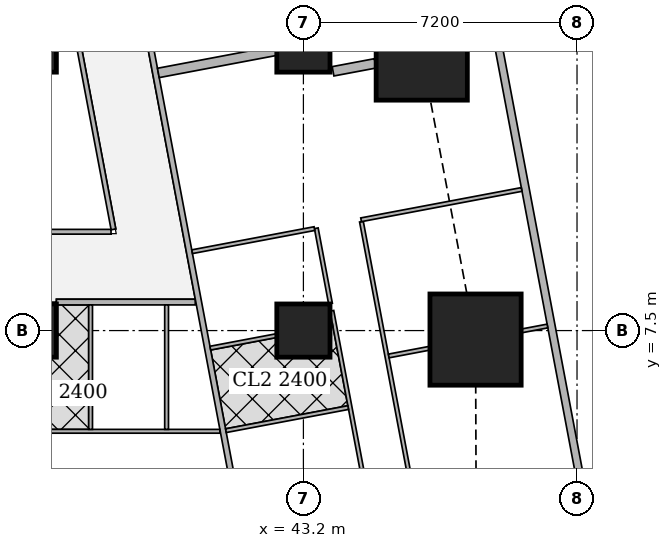
"""IFC4 building model, lengths in metres.
Left out: names, types, materials, properties, quantities, classifications, styles, units other than length and angle.
Written with IfcOpenShell. Run it as: python <this file> out.ifc"""

import sys

from ifc_helpers import new_model, si_unit, direction, frame, frame_2d, origin, origin_2d, place, context, subcontext, project, spatial, rectangle, extrude, element, fill, save


model = new_model("IFC4")
c1 = context("Model", 3, precision=1e-05, world=origin(), true_north=direction((0.0, 1.0)))
c2 = subcontext(c1, "Body", "Model", "MODEL_VIEW")
j1 = project(units=[si_unit("LENGTHUNIT", "METRE"), si_unit("PLANEANGLEUNIT", "RADIAN")], contexts=[c1])
p1 = place(None, origin())
s1 = spatial("IfcSite", under=j1, at=p1, CompositionType="ELEMENT")
p2 = place(p1, origin())
s2 = spatial("IfcBuilding", under=s1, at=p2, CompositionType="ELEMENT")
p3 = place(p2, frame((0.0, 0.0, 193.7)))
s3 = spatial("IfcBuildingStorey", under=s2, at=p3, CompositionType="ELEMENT", Elevation=193.7)
for number, where, z_axis, x_axis in (
    (1, (36.0, 7.5, 0.0), (0.0, 0.0, 1.0), (1.0, 0.0, 0.0)),
    (2, (43.2, 7.5, 0.0), (0.0, 0.0, 1.0), (1.0, 0.0, 0.0)),
):
    element("IfcColumn", number, at=place(p3, frame(where, z_axis=z_axis, x_axis=x_axis)), inside=s3, PredefinedType="COLUMN", context=c2, shape_type="SweptSolid", body=[
        extrude(rectangle(XDim=1.4, YDim=1.4, at=origin_2d()), origin(), (0.0, 0.0, 1.0), 3.75),
    ])
p4 = place(p3, frame((47.73, 7.263, 0.0), z_axis=(0.0, 0.0, 1.0), x_axis=(1.0, 0.0, 0.0)))
e3 = element("IfcColumn", 3, at=p4, inside=s3, PredefinedType="COLUMN", context=c2, shape_type="SweptSolid", body=[
    extrude(rectangle(XDim=2.4, YDim=2.4, at=origin_2d()), origin(), (0.0, 0.0, 1.0), 3.75),
])
for number, where, z_axis, x_axis in (
    (4, (36.0, 15.0, 0.0), (0.0, 0.0, 1.0), (1.0, 0.0, 0.0)),
    (5, (43.2, 15.0, 0.0), (0.0, 0.0, 1.0), (1.0, 0.0, 0.0)),
):
    element("IfcColumn", number, at=place(p3, frame(where, z_axis=z_axis, x_axis=x_axis)), inside=s3, PredefinedType="COLUMN", context=c2, shape_type="SweptSolid", body=[
        extrude(rectangle(XDim=1.4, YDim=1.4, at=origin_2d()), origin(), (0.0, 0.0, 1.0), 3.75),
    ])
p5 = place(p3, frame((46.314, 14.763, 0.0), z_axis=(0.0, 0.0, 1.0), x_axis=(1.0, 0.0, 0.0)))
e6 = element("IfcColumn", 6, at=p5, inside=s3, PredefinedType="COLUMN", context=c2, shape_type="SweptSolid", body=[
    extrude(rectangle(XDim=2.4, YDim=2.4, at=origin_2d()), origin(), (0.0, 0.0, 1.0), 3.75),
])
p6 = place(p3, frame((50.653, 2.703, 0.0), z_axis=(0.0, 0.0, 1.0), x_axis=(-0.185612026696, 0.982623109613, 0.0)))
e7 = element("IfcWall", 7, at=p6, inside=s3, PredefinedType="SOLIDWALL", context=c2, shape_type="SweptSolid", body=[
    extrude(rectangle(XDim=41.393, YDim=0.2, at=frame_2d((20.697, 0.0))), origin(), (0.0, 0.0, 1.0), 3.5),
])
p7 = place(p6, frame((1.633, 0.0, 0.9)))
e8 = element("IfcOpeningElement", 8, at=p7, cuts=e7, PredefinedType="OPENING", context=c2, shape_type="SweptSolid", body=[
    extrude(rectangle(XDim=1.8, YDim=1.5, at=frame_2d((0.9, 0.75))), frame((0.0, 0.11, 0.0), z_axis=(0.0, -1.0, 0.0), x_axis=(1.0, 0.0, 0.0)), (0.0, 0.0, 1.0), 0.22),
])
p8 = place(p6, frame((6.032, 0.0, 0.9)))
e9 = element("IfcOpeningElement", 9, at=p8, cuts=e7, PredefinedType="OPENING", context=c2, shape_type="SweptSolid", body=[
    extrude(rectangle(XDim=1.8, YDim=1.5, at=frame_2d((0.9, 0.75))), frame((0.0, 0.11, 0.0), z_axis=(0.0, -1.0, 0.0), x_axis=(1.0, 0.0, 0.0)), (0.0, 0.0, 1.0), 0.22),
])
p9 = place(p6, frame((9.848, 0.0, 0.9)))
e10 = element("IfcOpeningElement", 10, at=p9, cuts=e7, PredefinedType="OPENING", context=c2, shape_type="SweptSolid", body=[
    extrude(rectangle(XDim=1.8, YDim=1.5, at=frame_2d((0.9, 0.75))), frame((0.0, 0.11, 0.0), z_axis=(0.0, -1.0, 0.0), x_axis=(1.0, 0.0, 0.0)), (0.0, 0.0, 1.0), 0.22),
])
p10 = place(p6, frame((13.664, 0.0, 0.9)))
e11 = element("IfcOpeningElement", 11, at=p10, cuts=e7, PredefinedType="OPENING", context=c2, shape_type="SweptSolid", body=[
    extrude(rectangle(XDim=1.8, YDim=1.5, at=frame_2d((0.9, 0.75))), frame((0.0, 0.11, 0.0), z_axis=(0.0, -1.0, 0.0), x_axis=(1.0, 0.0, 0.0)), (0.0, 0.0, 1.0), 0.22),
])
p11 = place(p6, frame((17.481, 0.0, 0.9)))
e12 = element("IfcOpeningElement", 12, at=p11, cuts=e7, PredefinedType="OPENING", context=c2, shape_type="SweptSolid", body=[
    extrude(rectangle(XDim=1.8, YDim=1.5, at=frame_2d((0.9, 0.75))), frame((0.0, 0.11, 0.0), z_axis=(0.0, -1.0, 0.0), x_axis=(1.0, 0.0, 0.0)), (0.0, 0.0, 1.0), 0.22),
])
p12 = place(p6, frame((21.297, 0.0, 0.9)))
e13 = element("IfcOpeningElement", 13, at=p12, cuts=e7, PredefinedType="OPENING", context=c2, shape_type="SweptSolid", body=[
    extrude(rectangle(XDim=1.8, YDim=1.5, at=frame_2d((0.9, 0.75))), frame((0.0, 0.11, 0.0), z_axis=(0.0, -1.0, 0.0), x_axis=(1.0, 0.0, 0.0)), (0.0, 0.0, 1.0), 0.22),
])
p13 = place(p6, frame((25.113, 0.0, 0.9)))
e14 = element("IfcOpeningElement", 14, at=p13, cuts=e7, PredefinedType="OPENING", context=c2, shape_type="SweptSolid", body=[
    extrude(rectangle(XDim=1.8, YDim=1.5, at=frame_2d((0.9, 0.75))), frame((0.0, 0.11, 0.0), z_axis=(0.0, -1.0, 0.0), x_axis=(1.0, 0.0, 0.0)), (0.0, 0.0, 1.0), 0.22),
])
p14 = place(p6, frame((28.93, 0.0, 0.9)))
e15 = element("IfcOpeningElement", 15, at=p14, cuts=e7, PredefinedType="OPENING", context=c2, shape_type="SweptSolid", body=[
    extrude(rectangle(XDim=1.8, YDim=1.5, at=frame_2d((0.9, 0.75))), frame((0.0, 0.11, 0.0), z_axis=(0.0, -1.0, 0.0), x_axis=(1.0, 0.0, 0.0)), (0.0, 0.0, 1.0), 0.22),
])
p15 = place(p6, frame((32.746, 0.0, 0.9)))
e16 = element("IfcOpeningElement", 16, at=p15, cuts=e7, PredefinedType="OPENING", context=c2, shape_type="SweptSolid", body=[
    extrude(rectangle(XDim=1.8, YDim=1.5, at=frame_2d((0.9, 0.75))), frame((0.0, 0.11, 0.0), z_axis=(0.0, -1.0, 0.0), x_axis=(1.0, 0.0, 0.0)), (0.0, 0.0, 1.0), 0.22),
])
p16 = place(p6, frame((36.481, 0.0, 0.9)))
e17 = element("IfcOpeningElement", 17, at=p16, cuts=e7, PredefinedType="OPENING", context=c2, shape_type="SweptSolid", body=[
    extrude(rectangle(XDim=1.8, YDim=1.5, at=frame_2d((0.9, 0.75))), frame((0.0, 0.11, 0.0), z_axis=(0.0, -1.0, 0.0), x_axis=(1.0, 0.0, 0.0)), (0.0, 0.0, 1.0), 0.22),
])
p17 = place(p3, frame((40.355, 8.25, 0.0), z_axis=(0.0, 0.0, 1.0), x_axis=(-1.0, 0.0, 0.0)))
e18 = element("IfcWall", 18, at=p17, inside=s3, PredefinedType="SOLIDWALL", context=c2, shape_type="SweptSolid", body=[
    extrude(rectangle(XDim=3.654, YDim=0.15, at=frame_2d((1.827, 0.0))), origin(), (0.0, 0.0, 1.0), 3.5),
])
p18 = place(p3, frame((33.933, 42.73, 0.0), z_axis=(0.0, 0.0, 1.0), x_axis=(0.185595417643, -0.982626246825, 0.0)))
e19 = element("IfcWall", 19, at=p18, inside=s3, PredefinedType="SOLIDWALL", context=c2, shape_type="SweptSolid", body=[
    extrude(rectangle(XDim=41.051, YDim=0.15, at=frame_2d((20.525, 0.0))), origin(), (0.0, 0.0, 1.0), 2.5),
])
p19 = place(p18, frame((16.082, 0.0, 0.0)))
e20 = element("IfcOpeningElement", 20, at=p19, cuts=e19, PredefinedType="OPENING", context=c2, shape_type="SweptSolid", body=[
    extrude(rectangle(XDim=1.0, YDim=2.1, at=frame_2d((0.5, 1.05))), frame((0.0, 0.085, 0.0), z_axis=(0.0, -1.0, 0.0), x_axis=(1.0, 0.0, 0.0)), (0.0, 0.0, 1.0), 0.17),
])
p20 = place(p18, frame((19.898, 0.0, 0.0)))
e21 = element("IfcOpeningElement", 21, at=p20, cuts=e19, PredefinedType="OPENING", context=c2, shape_type="SweptSolid", body=[
    extrude(rectangle(XDim=1.0, YDim=2.1, at=frame_2d((0.5, 1.05))), frame((0.0, 0.085, 0.0), z_axis=(0.0, -1.0, 0.0), x_axis=(1.0, 0.0, 0.0)), (0.0, 0.0, 1.0), 0.17),
])
p21 = place(p18, frame((30.862, 0.0, 0.0)))
e22 = element("IfcOpeningElement", 22, at=p21, cuts=e19, PredefinedType="OPENING", context=c2, shape_type="SweptSolid", body=[
    extrude(rectangle(XDim=1.0, YDim=2.1, at=frame_2d((0.5, 1.05))), frame((0.0, 0.085, 0.0), z_axis=(0.0, -1.0, 0.0), x_axis=(1.0, 0.0, 0.0)), (0.0, 0.0, 1.0), 0.17),
])
p22 = place(p3, frame((41.002, 4.85, 0.0), z_axis=(0.0, 0.0, 1.0), x_axis=(-1.0, 0.0, 0.0)))
e23 = element("IfcWall", 23, at=p22, inside=s3, PredefinedType="PARTITIONING", context=c2, shape_type="SweptSolid", body=[
    extrude(rectangle(XDim=8.602, YDim=0.1, at=frame_2d((4.301, 0.0))), origin(), (0.0, 0.0, 1.0), 3.5),
])
p23 = place(p22, frame((7.047, 0.0, 0.0)))
e24 = element("IfcOpeningElement", 24, at=p23, cuts=e23, PredefinedType="OPENING", context=c2, shape_type="SweptSolid", body=[
    extrude(rectangle(XDim=0.9, YDim=2.1, at=frame_2d((0.45, 1.05))), frame((0.0, 0.06, 0.0), z_axis=(0.0, -1.0, 0.0), x_axis=(1.0, 0.0, 0.0)), (0.0, 0.0, 1.0), 0.12),
])
p24 = place(p22, frame((3.752, 0.0, 0.0)))
e25 = element("IfcOpeningElement", 25, at=p24, cuts=e23, PredefinedType="OPENING", context=c2, shape_type="SweptSolid", body=[
    extrude(rectangle(XDim=0.9, YDim=2.1, at=frame_2d((0.45, 1.05))), frame((0.0, 0.06, 0.0), z_axis=(0.0, -1.0, 0.0), x_axis=(1.0, 0.0, 0.0)), (0.0, 0.0, 1.0), 0.12),
])
p25 = place(p22, frame((0.15, 0.0, 0.0)))
e26 = element("IfcOpeningElement", 26, at=p25, cuts=e23, PredefinedType="OPENING", context=c2, shape_type="SweptSolid", body=[
    extrude(rectangle(XDim=0.9, YDim=2.1, at=frame_2d((0.45, 1.05))), frame((0.0, 0.06, 0.0), z_axis=(0.0, -1.0, 0.0), x_axis=(1.0, 0.0, 0.0)), (0.0, 0.0, 1.0), 0.12),
])
p26 = place(p22, frame((5.247, 0.0, 0.0)))
e27 = element("IfcOpeningElement", 27, at=p26, cuts=e23, PredefinedType="OPENING", context=c2, shape_type="SweptSolid", body=[
    extrude(rectangle(XDim=0.9, YDim=2.1, at=frame_2d((0.45, 1.05))), frame((0.0, 0.06, 0.0), z_axis=(0.0, -1.0, 0.0), x_axis=(1.0, 0.0, 0.0)), (0.0, 0.0, 1.0), 0.12),
])
p27 = place(p22, frame((1.952, 0.0, 0.0)))
e28 = element("IfcOpeningElement", 28, at=p27, cuts=e23, PredefinedType="OPENING", context=c2, shape_type="SweptSolid", body=[
    extrude(rectangle(XDim=0.9, YDim=2.1, at=frame_2d((0.45, 1.05))), frame((0.0, 0.06, 0.0), z_axis=(0.0, -1.0, 0.0), x_axis=(1.0, 0.0, 0.0)), (0.0, 0.0, 1.0), 0.12),
])
for number, where, z_axis, x_axis in (
    (29, (39.6, 4.9, 0.0), (0.0, 0.0, 1.0), (0.0, 1.0, 0.0)),
    (30, (37.6, 4.9, 0.0), (0.0, 0.0, 1.0), (0.0, 1.0, 0.0)),
):
    element("IfcWall", number, at=place(p3, frame(where, z_axis=z_axis, x_axis=x_axis)), inside=s3, PredefinedType="PARTITIONING", context=c2, shape_type="SweptSolid", body=[
        extrude(rectangle(XDim=3.275, YDim=0.1, at=frame_2d((1.638, 0.0))), origin(), (0.0, 0.0, 1.0), 3.5),
    ])
p28 = place(p3, frame((44.727, 10.366, 0.0), z_axis=(0.0, 0.0, 1.0), x_axis=(0.185678775129, -0.982610498858, 0.0)))
e31 = element("IfcWall", 31, at=p28, inside=s3, PredefinedType="PARTITIONING", context=c2, shape_type="SweptSolid", body=[
    extrude(rectangle(XDim=7.421, YDim=0.1, at=frame_2d((3.71, 0.0))), origin(), (0.0, 0.0, 1.0), 3.5),
])
p29 = place(p28, frame((0.151, 0.0, 0.0)))
e32 = element("IfcOpeningElement", 32, at=p29, cuts=e31, PredefinedType="OPENING", context=c2, shape_type="SweptSolid", body=[
    extrude(rectangle(XDim=0.9, YDim=2.1, at=frame_2d((0.45, 1.05))), frame((0.0, 0.06, 0.0), z_axis=(0.0, -1.0, 0.0), x_axis=(1.0, 0.0, 0.0)), (0.0, 0.0, 1.0), 0.12),
])
p30 = place(p28, frame((4.65, 0.0, 0.0)))
e33 = element("IfcOpeningElement", 33, at=p30, cuts=e31, PredefinedType="OPENING", context=c2, shape_type="SweptSolid", body=[
    extrude(rectangle(XDim=0.9, YDim=2.1, at=frame_2d((0.45, 1.05))), frame((0.0, 0.06, 0.0), z_axis=(0.0, -1.0, 0.0), x_axis=(1.0, 0.0, 0.0)), (0.0, 0.0, 1.0), 0.12),
])
p31 = place(p3, frame((43.539, 10.192, 0.0), z_axis=(0.0, 0.0, 1.0), x_axis=(0.185443145218, -0.982654995353, 0.0)))
e34 = element("IfcWall", 34, at=p31, inside=s3, PredefinedType="PARTITIONING", context=c2, shape_type="SweptSolid", body=[
    extrude(rectangle(XDim=2.017, YDim=0.1, at=frame_2d((1.008, 0.0))), origin(), (0.0, 0.0, 1.0), 3.5),
])
p32 = place(p3, frame((43.949, 8.02, 0.0), z_axis=(0.0, 0.0, 1.0), x_axis=(0.185656792073, -0.982614652627, 0.0)))
e35 = element("IfcWall", 35, at=p32, inside=s3, PredefinedType="PARTITIONING", context=c2, shape_type="SweptSolid", body=[
    extrude(rectangle(XDim=5.289, YDim=0.1, at=frame_2d((2.645, 0.0))), origin(), (0.0, 0.0, 1.0), 3.5),
])
p33 = place(p32, frame((1.2, 0.0, 0.0)))
e36 = element("IfcOpeningElement", 36, at=p33, cuts=e35, PredefinedType="OPENING", context=c2, shape_type="SweptSolid", body=[
    extrude(rectangle(XDim=0.9, YDim=2.1, at=frame_2d((0.45, 1.05))), frame((0.0, 0.06, 0.0), z_axis=(0.0, -1.0, 0.0), x_axis=(1.0, 0.0, 0.0)), (0.0, 0.0, 1.0), 0.12),
])
p34 = place(p32, frame((2.935, 0.0, 0.0)))
e37 = element("IfcOpeningElement", 37, at=p34, cuts=e35, PredefinedType="OPENING", context=c2, shape_type="SweptSolid", body=[
    extrude(rectangle(XDim=0.9, YDim=2.1, at=frame_2d((0.45, 1.05))), frame((0.0, 0.06, 0.0), z_axis=(0.0, -1.0, 0.0), x_axis=(1.0, 0.0, 0.0)), (0.0, 0.0, 1.0), 0.12),
])
p35 = place(p3, frame((48.943, 11.213, 0.0), z_axis=(0.0, 0.0, 1.0), x_axis=(-0.982633535512, -0.185556823879, 0.0)))
e38 = element("IfcWall", 38, at=p35, inside=s3, PredefinedType="PARTITIONING", context=c2, shape_type="SweptSolid", body=[
    extrude(rectangle(XDim=4.3, YDim=0.1, at=frame_2d((2.15, 0.0))), origin(), (0.0, 0.0, 1.0), 2.05),
])
p36 = place(p3, frame((49.622, 7.62, 0.0), z_axis=(0.0, 0.0, 1.0), x_axis=(-0.98254419619, -0.186029305578, 0.0)))
e39 = element("IfcWall", 39, at=p36, inside=s3, PredefinedType="PARTITIONING", context=c2, shape_type="SweptSolid", body=[
    extrude(rectangle(XDim=0.694, YDim=0.1, at=frame_2d((0.347, 0.0))), origin(), (0.0, 0.0, 1.0), 3.5),
])
p37 = place(p3, frame((46.52, 7.035, 0.0), z_axis=(0.0, 0.0, 1.0), x_axis=(-0.982620932907, -0.185623549726, 0.0)))
e40 = element("IfcWall", 40, at=p37, inside=s3, PredefinedType="PARTITIONING", context=c2, shape_type="SweptSolid", body=[
    extrude(rectangle(XDim=1.093, YDim=0.1, at=frame_2d((0.546, 0.0))), origin(), (0.0, 0.0, 1.0), 3.5),
])
p38 = place(p3, frame((43.49, 10.183, 0.0), z_axis=(0.0, 0.0, 1.0), x_axis=(-0.982607026909, -0.185697147715, 0.0)))
e41 = element("IfcWall", 41, at=p38, inside=s3, PredefinedType="PARTITIONING", context=c2, shape_type="SweptSolid", body=[
    extrude(rectangle(XDim=3.275, YDim=0.1, at=frame_2d((1.637, 0.0))), origin(), (0.0, 0.0, 1.0), 3.5),
])
p39 = place(p38, frame((1.2, 0.0, 0.0)))
e42 = element("IfcOpeningElement", 42, at=p39, cuts=e41, PredefinedType="OPENING", context=c2, shape_type="SweptSolid", body=[
    extrude(rectangle(XDim=0.9, YDim=2.1, at=frame_2d((0.45, 1.05))), frame((0.0, 0.06, 0.0), z_axis=(0.0, -1.0, 0.0), x_axis=(1.0, 0.0, 0.0)), (0.0, 0.0, 1.0), 0.12),
])
p40 = place(p3, frame((43.969, 7.646, 0.0), z_axis=(0.0, 0.0, 1.0), x_axis=(-0.983147034646, -0.182816597351, 0.0)))
e43 = element("IfcWall", 43, at=p40, inside=s3, PredefinedType="PARTITIONING", context=c2, shape_type="SweptSolid", body=[
    extrude(rectangle(XDim=0.06, YDim=0.1, at=frame_2d((0.03, 0.0))), origin(), (0.0, 0.0, 1.0), 3.5),
])
p41 = place(p3, frame((42.49, 7.367, 0.0), z_axis=(0.0, 0.0, 1.0), x_axis=(-0.982585223885, -0.185812480215, 0.0)))
e44 = element("IfcWall", 44, at=p41, inside=s3, PredefinedType="PARTITIONING", context=c2, shape_type="SweptSolid", body=[
    extrude(rectangle(XDim=1.77, YDim=0.1, at=frame_2d((0.885, 0.0))), origin(), (0.0, 0.0, 1.0), 3.5),
])
p42 = place(p3, frame((44.379, 5.474, 0.0), z_axis=(0.0, 0.0, 1.0), x_axis=(-0.982607026909, -0.185697147715, 0.0)))
e45 = element("IfcWall", 45, at=p42, inside=s3, PredefinedType="PARTITIONING", context=c2, shape_type="SweptSolid", body=[
    extrude(rectangle(XDim=3.275, YDim=0.1, at=frame_2d((1.637, 0.0))), origin(), (0.0, 0.0, 1.0), 3.5),
])
p43 = place(p3, frame((45.09, 14.531, 0.0), z_axis=(0.0, 0.0, 1.0), x_axis=(-0.982737354171, -0.185006196431, 0.0)))
e46 = element("IfcWall", 46, at=p43, inside=s3, PredefinedType="SOLIDWALL", context=c2, shape_type="SweptSolid", body=[
    extrude(rectangle(XDim=1.13, YDim=0.25, at=frame_2d((0.565, 0.0))), origin(), (0.0, 0.0, 1.0), 2.05),
])
p44 = place(p3, frame((42.476, 14.863, 0.0), z_axis=(0.0, 0.0, 1.0), x_axis=(-0.982638716117, -0.185529387398, 0.0)))
e47 = element("IfcWall", 47, at=p44, inside=s3, PredefinedType="SOLIDWALL", context=c2, shape_type="SweptSolid", body=[
    extrude(rectangle(XDim=3.148, YDim=0.25, at=frame_2d((1.574, 0.0))), origin(), (0.0, 0.0, 1.0), 3.5),
])
p45 = place(p3, frame((28.95, 10.1, 0.0), z_axis=(0.0, 0.0, 1.0), x_axis=(1.0, 0.0, 0.0)))
e48 = element("IfcWall", 48, at=p45, inside=s3, PredefinedType="PARTITIONING", context=c2, shape_type="SweptSolid", body=[
    extrude(rectangle(XDim=9.188, YDim=0.125, at=frame_2d((4.594, 0.0))), origin(), (0.0, 0.0, 1.0), 3.5),
])
p46 = place(p3, frame((38.202, 10.163, 0.0), z_axis=(0.0, 0.0, 1.0), x_axis=(-0.185645577403, 0.982616771479, 0.0)))
e49 = element("IfcWall", 49, at=p46, inside=s3, PredefinedType="PARTITIONING", context=c2, shape_type="SweptSolid", body=[
    extrude(rectangle(XDim=12.555, YDim=0.125, at=frame_2d((6.278, 0.0))), origin(), (0.0, 0.0, 1.0), 2.5),
])
p47 = place(p46, frame((0.708, 0.0, 0.0)))
e50 = element("IfcOpeningElement", 50, at=p47, cuts=e49, PredefinedType="OPENING", context=c2, shape_type="SweptSolid", body=[
    extrude(rectangle(XDim=1.0, YDim=2.1, at=frame_2d((0.5, 1.05))), frame((0.0, 0.073, 0.0), z_axis=(0.0, -1.0, 0.0), x_axis=(1.0, 0.0, 0.0)), (0.0, 0.0, 1.0), 0.145),
])
p48 = place(p46, frame((5.9, 0.0, 0.0)))
e51 = element("IfcOpeningElement", 51, at=p48, cuts=e49, PredefinedType="OPENING", context=c2, shape_type="SweptSolid", body=[
    extrude(rectangle(XDim=1.0, YDim=2.1, at=frame_2d((0.5, 1.05))), frame((0.0, 0.073, 0.0), z_axis=(0.0, -1.0, 0.0), x_axis=(1.0, 0.0, 0.0)), (0.0, 0.0, 1.0), 0.145),
])
p49 = place(p46, frame((9.562, 0.0, 0.0)))
e52 = element("IfcOpeningElement", 52, at=p49, cuts=e49, PredefinedType="OPENING", context=c2, shape_type="SweptSolid", body=[
    extrude(rectangle(XDim=1.0, YDim=2.1, at=frame_2d((0.5, 1.05))), frame((0.0, 0.073, 0.0), z_axis=(0.0, -1.0, 0.0), x_axis=(1.0, 0.0, 0.0)), (0.0, 0.0, 1.0), 0.145),
])
p50 = place(p7, origin())
e53 = element("IfcWindow", 53, at=p50, inside=s3, PartitioningType="SINGLE_PANEL", PredefinedType="WINDOW", context=c2, shape_type="SweptSolid", body=[
    extrude(rectangle(XDim=1.8, YDim=1.5, at=frame_2d((0.9, 0.75))), frame((0.0, 0.03, 0.0), z_axis=(0.0, -1.0, 0.0), x_axis=(1.0, 0.0, 0.0)), (0.0, 0.0, 1.0), 0.06),
])
fill(e8, e53)
p51 = place(p8, origin())
e54 = element("IfcWindow", 54, at=p51, inside=s3, PartitioningType="SINGLE_PANEL", PredefinedType="WINDOW", context=c2, shape_type="SweptSolid", body=[
    extrude(rectangle(XDim=1.8, YDim=1.5, at=frame_2d((0.9, 0.75))), frame((0.0, 0.03, 0.0), z_axis=(0.0, -1.0, 0.0), x_axis=(1.0, 0.0, 0.0)), (0.0, 0.0, 1.0), 0.06),
])
fill(e9, e54)
p52 = place(p9, origin())
e55 = element("IfcWindow", 55, at=p52, inside=s3, PartitioningType="SINGLE_PANEL", PredefinedType="WINDOW", context=c2, shape_type="SweptSolid", body=[
    extrude(rectangle(XDim=1.8, YDim=1.5, at=frame_2d((0.9, 0.75))), frame((0.0, 0.03, 0.0), z_axis=(0.0, -1.0, 0.0), x_axis=(1.0, 0.0, 0.0)), (0.0, 0.0, 1.0), 0.06),
])
fill(e10, e55)
p53 = place(p24, origin())
e56 = element("IfcDoor", 56, at=p53, inside=s3, OperationType="SINGLE_SWING_LEFT", PredefinedType="DOOR", context=c2, shape_type="SweptSolid", body=[
    extrude(rectangle(XDim=0.9, YDim=2.1, at=frame_2d((0.45, 1.05))), frame((0.0, 0.025, 0.0), z_axis=(0.0, -1.0, 0.0), x_axis=(1.0, 0.0, 0.0)), (0.0, 0.0, 1.0), 0.05),
])
fill(e25, e56)
p54 = place(p25, origin())
e57 = element("IfcDoor", 57, at=p54, inside=s3, OperationType="SINGLE_SWING_RIGHT", PredefinedType="DOOR", context=c2, shape_type="SweptSolid", body=[
    extrude(rectangle(XDim=0.9, YDim=2.1, at=frame_2d((0.45, 1.05))), frame((0.0, 0.025, 0.0), z_axis=(0.0, -1.0, 0.0), x_axis=(1.0, 0.0, 0.0)), (0.0, 0.0, 1.0), 0.05),
])
fill(e26, e57)
p55 = place(p27, origin())
e58 = element("IfcDoor", 58, at=p55, inside=s3, OperationType="SINGLE_SWING_RIGHT", PredefinedType="DOOR", context=c2, shape_type="SweptSolid", body=[
    extrude(rectangle(XDim=0.9, YDim=2.1, at=frame_2d((0.45, 1.05))), frame((0.0, 0.025, 0.0), z_axis=(0.0, -1.0, 0.0), x_axis=(1.0, 0.0, 0.0)), (0.0, 0.0, 1.0), 0.05),
])
fill(e28, e58)
p56 = place(p29, origin())
e59 = element("IfcDoor", 59, at=p56, inside=s3, OperationType="SINGLE_SWING_LEFT", PredefinedType="DOOR", context=c2, shape_type="SweptSolid", body=[
    extrude(rectangle(XDim=0.9, YDim=2.1, at=frame_2d((0.45, 1.05))), frame((0.0, 0.025, 0.0), z_axis=(0.0, -1.0, 0.0), x_axis=(1.0, 0.0, 0.0)), (0.0, 0.0, 1.0), 0.05),
])
fill(e32, e59)
p57 = place(p30, origin())
e60 = element("IfcDoor", 60, at=p57, inside=s3, OperationType="SINGLE_SWING_LEFT", PredefinedType="DOOR", context=c2, shape_type="SweptSolid", body=[
    extrude(rectangle(XDim=0.9, YDim=2.1, at=frame_2d((0.45, 1.05))), frame((0.0, 0.025, 0.0), z_axis=(0.0, -1.0, 0.0), x_axis=(1.0, 0.0, 0.0)), (0.0, 0.0, 1.0), 0.05),
])
fill(e33, e60)
p58 = place(p33, origin())
e61 = element("IfcDoor", 61, at=p58, inside=s3, OperationType="SINGLE_SWING_LEFT", PredefinedType="DOOR", context=c2, shape_type="SweptSolid", body=[
    extrude(rectangle(XDim=0.9, YDim=2.1, at=frame_2d((0.45, 1.05))), frame((0.0, 0.025, 0.0), z_axis=(0.0, -1.0, 0.0), x_axis=(1.0, 0.0, 0.0)), (0.0, 0.0, 1.0), 0.05),
])
fill(e36, e61)
p59 = place(p34, origin())
e62 = element("IfcDoor", 62, at=p59, inside=s3, OperationType="SINGLE_SWING_RIGHT", PredefinedType="DOOR", context=c2, shape_type="SweptSolid", body=[
    extrude(rectangle(XDim=0.9, YDim=2.1, at=frame_2d((0.45, 1.05))), frame((0.0, 0.025, 0.0), z_axis=(0.0, -1.0, 0.0), x_axis=(1.0, 0.0, 0.0)), (0.0, 0.0, 1.0), 0.05),
])
fill(e37, e62)
p60 = place(p21, origin())
e63 = element("IfcDoor", 63, at=p60, inside=s3, OperationType="SINGLE_SWING_LEFT", PredefinedType="DOOR", context=c2, shape_type="SweptSolid", body=[
    extrude(rectangle(XDim=1.0, YDim=2.1, at=frame_2d((0.5, 1.05))), frame((0.0, 0.025, 0.0), z_axis=(0.0, -1.0, 0.0), x_axis=(1.0, 0.0, 0.0)), (0.0, 0.0, 1.0), 0.05),
])
fill(e22, e63)
p61 = place(p39, origin())
e64 = element("IfcDoor", 64, at=p61, inside=s3, OperationType="SINGLE_SWING_RIGHT", PredefinedType="DOOR", context=c2, shape_type="SweptSolid", body=[
    extrude(rectangle(XDim=0.9, YDim=2.1, at=frame_2d((0.45, 1.05))), frame((0.0, 0.025, 0.0), z_axis=(0.0, -1.0, 0.0), x_axis=(1.0, 0.0, 0.0)), (0.0, 0.0, 1.0), 0.05),
])
fill(e42, e64)
p62 = place(p47, origin())
e65 = element("IfcDoor", 65, at=p62, inside=s3, OperationType="SINGLE_SWING_LEFT", PredefinedType="DOOR", context=c2, shape_type="SweptSolid", body=[
    extrude(rectangle(XDim=1.0, YDim=2.1, at=frame_2d((0.5, 1.05))), frame((0.0, 0.025, 0.0), z_axis=(0.0, -1.0, 0.0), x_axis=(1.0, 0.0, 0.0)), (0.0, 0.0, 1.0), 0.05),
])
fill(e50, e65)
save(model, sys.argv[1])
